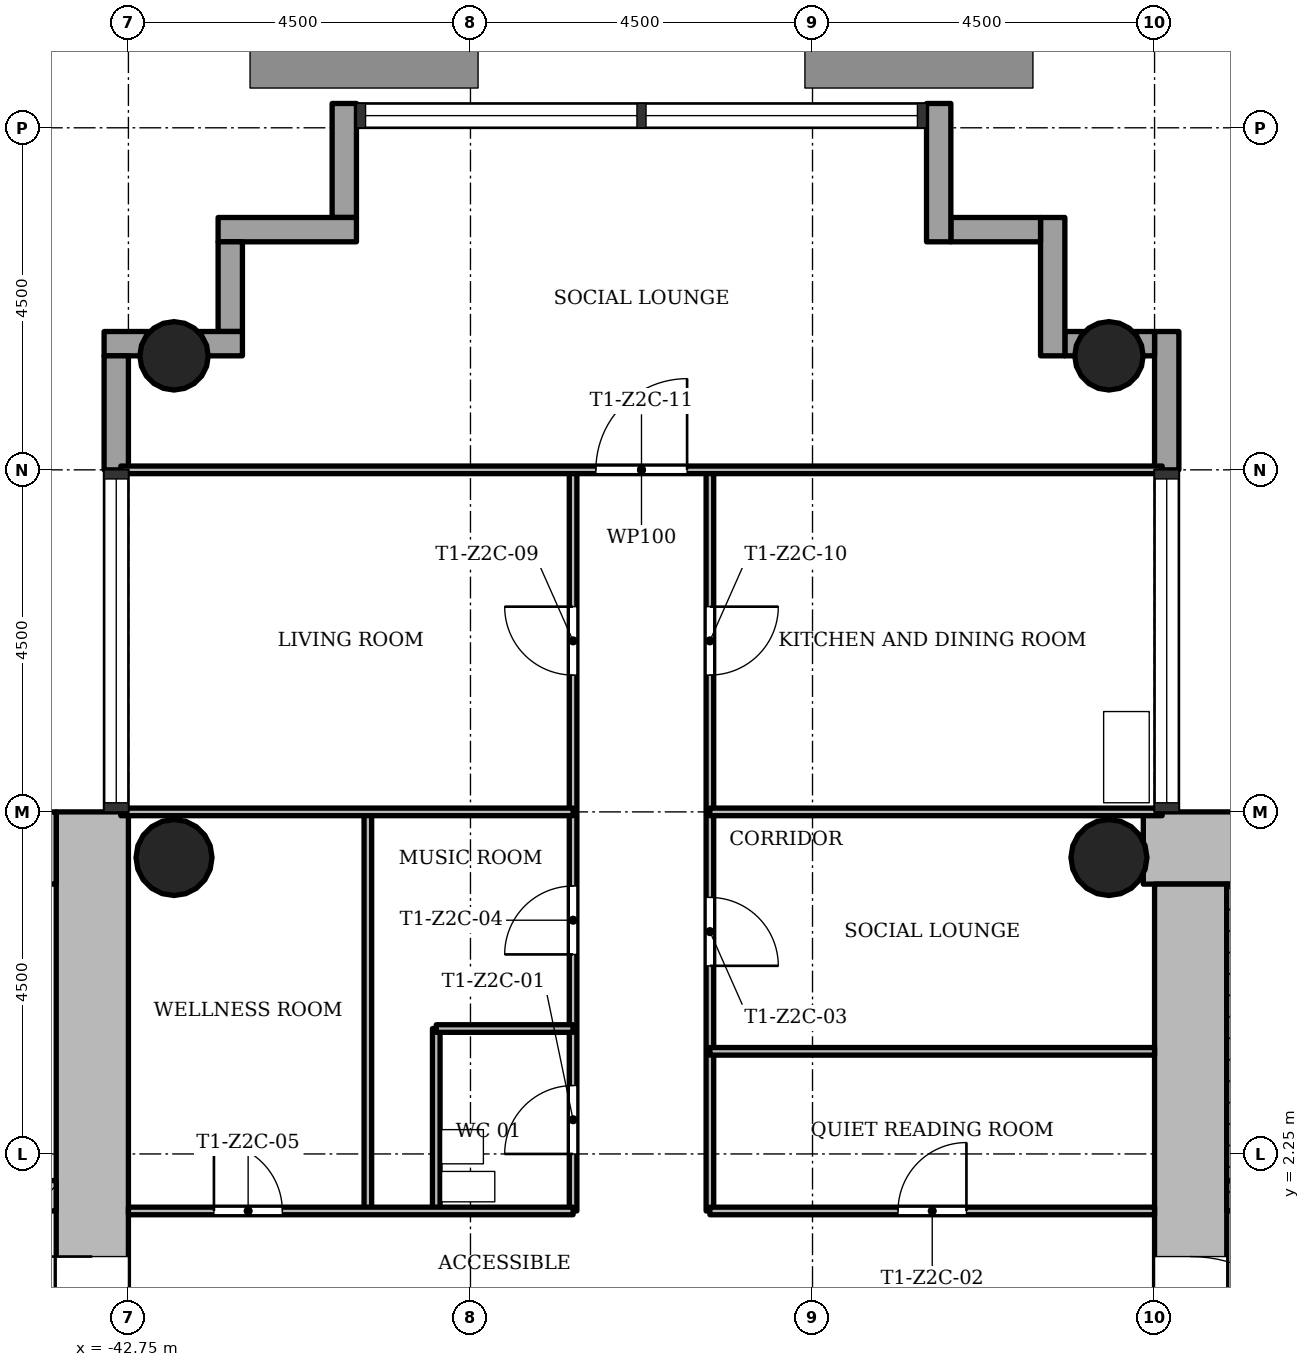
"""IFC4 building model, lengths in metres.
Left out: names, types, materials, properties, quantities, classifications, styles, units other than length and angle.
Written with IfcOpenShell. Run it as: python <this file> out.ifc"""

import sys

from ifc_helpers import new_model, si_unit, direction, frame, frame_2d, origin, origin_2d, place, context, subcontext, project, spatial, rectangle, hollow_circle, extrude, element, fill, save


model = new_model("IFC4")
c1 = context("Model", 3, precision=1e-05, world=origin(), true_north=direction((0.0, 1.0)))
c2 = subcontext(c1, "Body", "Model", "MODEL_VIEW")
j1 = project(units=[si_unit("LENGTHUNIT", "METRE"), si_unit("PLANEANGLEUNIT", "RADIAN")], contexts=[c1])
p1 = place(None, origin())
s1 = spatial("IfcSite", under=j1, at=p1, CompositionType="ELEMENT")
p2 = place(p1, origin())
s2 = spatial("IfcBuilding", under=s1, at=p2, CompositionType="ELEMENT")
p3 = place(p2, frame((0.0, 0.0, 93.6)))
s3 = spatial("IfcBuildingStorey", under=s2, at=p3, CompositionType="ELEMENT", Elevation=93.6)
p4 = place(p3, frame((-20.702, 6.275, 0.0), z_axis=(0.0, 0.0, 1.0), x_axis=(-1.0, 0.0, 0.0)))
e1 = element("IfcWall", 1, at=p4, inside=s3, PredefinedType="SHEAR", context=c2, shape_type="SweptSolid", body=[
    extrude(rectangle(XDim=8.696, YDim=0.95, at=frame_2d((4.348, 0.0))), origin(), (0.0, 0.0, 1.0), 3.4),
])
p5 = place(p3, frame((-28.775, 5.8, 0.0), z_axis=(0.0, 0.0, 1.0), x_axis=(0.0, -1.0, 0.0)))
e2 = element("IfcWall", 2, at=p5, inside=s3, PredefinedType="SHEAR", context=c2, shape_type="SweptSolid", body=[
    extrude(rectangle(XDim=12.55, YDim=0.95, at=frame_2d((6.275, 0.0))), origin(), (0.0, 0.0, 1.0), 3.4),
])
p6 = place(p5, frame((4.9, 0.0, 0.0)))
e3 = element("IfcOpeningElement", 3, at=p6, cuts=e2, PredefinedType="OPENING", context=c2, shape_type="SweptSolid", body=[
    extrude(rectangle(XDim=1.8, YDim=2.1, at=frame_2d((0.9, 1.05))), frame((0.0, 0.485, 0.0), z_axis=(0.0, -1.0, 0.0), x_axis=(1.0, 0.0, 0.0)), (0.0, 0.0, 1.0), 0.97),
])
p7 = place(p3, frame((-28.3, 1.7, 0.0), z_axis=(0.0, 0.0, 1.0), x_axis=(1.0, 0.0, 0.0)))
e4 = element("IfcWall", 4, at=p7, inside=s3, PredefinedType="SHEAR", context=c2, shape_type="SweptSolid", body=[
    extrude(rectangle(XDim=7.1, YDim=0.4, at=frame_2d((3.55, 0.0))), origin(), (0.0, 0.0, 1.0), 3.4),
])
p8 = place(p7, frame((0.7, 0.0, 0.0)))
e5 = element("IfcOpeningElement", 5, at=p8, cuts=e4, PredefinedType="OPENING", context=c2, shape_type="SweptSolid", body=[
    extrude(rectangle(XDim=0.9, YDim=2.1, at=frame_2d((0.45, 1.05))), frame((0.0, 0.21, 0.0), z_axis=(0.0, -1.0, 0.0), x_axis=(1.0, 0.0, 0.0)), (0.0, 0.0, 1.0), 0.42),
])
p9 = place(p3, frame((-43.225, -5.8, 0.0), z_axis=(0.0, 0.0, 1.0), x_axis=(0.0, 1.0, 0.0)))
e6 = element("IfcWall", 6, at=p9, inside=s3, PredefinedType="SHEAR", context=c2, shape_type="SweptSolid", body=[
    extrude(rectangle(XDim=12.55, YDim=0.95, at=frame_2d((6.275, 0.0))), origin(), (0.0, 0.0, 1.0), 3.4),
])
p10 = place(p9, frame((4.9, 0.0, 0.0)))
e7 = element("IfcOpeningElement", 7, at=p10, cuts=e6, PredefinedType="OPENING", context=c2, shape_type="SweptSolid", body=[
    extrude(rectangle(XDim=1.8, YDim=2.1, at=frame_2d((0.9, 1.05))), frame((0.0, 0.485, 0.0), z_axis=(0.0, -1.0, 0.0), x_axis=(1.0, 0.0, 0.0)), (0.0, 0.0, 1.0), 0.97),
])
p11 = place(p3, frame((-43.7, 6.275, 0.0), z_axis=(0.0, 0.0, 1.0), x_axis=(-1.0, 0.0, 0.0)))
e8 = element("IfcWall", 8, at=p11, inside=s3, PredefinedType="SHEAR", context=c2, shape_type="SweptSolid", body=[
    extrude(rectangle(XDim=8.05, YDim=0.95, at=frame_2d((4.025, 0.0))), origin(), (0.0, 0.0, 1.0), 3.4),
])
p12 = place(p3, frame((-50.8, 1.7, 0.0), z_axis=(0.0, 0.0, 1.0), x_axis=(1.0, 0.0, 0.0)))
e9 = element("IfcWall", 9, at=p12, inside=s3, PredefinedType="SHEAR", context=c2, shape_type="SweptSolid", body=[
    extrude(rectangle(XDim=7.1, YDim=0.4, at=frame_2d((3.55, 0.0))), origin(), (0.0, 0.0, 1.0), 3.4),
])
p13 = place(p12, frame((5.2, 0.0, 0.0)))
e10 = element("IfcOpeningElement", 10, at=p13, cuts=e9, PredefinedType="OPENING", context=c2, shape_type="SweptSolid", body=[
    extrude(rectangle(XDim=1.1, YDim=2.1, at=frame_2d((0.55, 1.05))), frame((0.0, 0.21, 0.0), z_axis=(0.0, -1.0, 0.0), x_axis=(1.0, 0.0, 0.0)), (0.0, 0.0, 1.0), 0.42),
])
for number, where, z_axis, x_axis in (
    (11, (-29.85, 12.75, 0.0), (0.0, 0.0, 1.0), (1.0, 0.0, 0.0)),
    (12, (-42.15, 12.75, 0.0), (0.0, 0.0, 1.0), (1.0, 0.0, 0.0)),
):
    element("IfcColumn", number, at=place(p3, frame(where, z_axis=z_axis, x_axis=x_axis)), inside=s3, PredefinedType="COLUMN", context=c2, shape_type="SweptSolid", body=[
        extrude(hollow_circle(Radius=0.45, WallThickness=0.032, at=origin_2d()), origin(), (0.0, 0.0, 1.0), 3.4),
    ])
for number, where, z_axis, x_axis in (
    (13, (-29.85, 6.15, 0.0), (0.0, 0.0, 1.0), (1.0, 0.0, 0.0)),
    (14, (-42.15, 6.15, 0.0), (0.0, 0.0, 1.0), (1.0, 0.0, 0.0)),
):
    element("IfcColumn", number, at=place(p3, frame(where, z_axis=z_axis, x_axis=x_axis)), inside=s3, PredefinedType="COLUMN", context=c2, shape_type="SweptSolid", body=[
        extrude(hollow_circle(Radius=0.5, WallThickness=0.036, at=origin_2d()), origin(), (0.0, 0.0, 1.0), 3.4),
    ])
p14 = place(p3, frame((-29.09, 11.25, -0.3), z_axis=(0.0, 0.0, 1.0), x_axis=(0.0, 1.0, 0.0)))
e15 = element("IfcWall", 15, at=p14, inside=s3, PredefinedType="STANDARD", context=c2, shape_type="SweptSolid", body=[
    extrude(rectangle(XDim=1.82, YDim=0.32, at=frame_2d((0.91, 0.0))), origin(), (0.0, 0.0, 1.0), 3.4),
])
p15 = place(p3, frame((-29.25, 12.91, -0.3), z_axis=(0.0, 0.0, 1.0), x_axis=(-1.0, 0.0, 0.0)))
e16 = element("IfcWall", 16, at=p15, inside=s3, PredefinedType="STANDARD", context=c2, shape_type="SweptSolid", body=[
    extrude(rectangle(XDim=1.18, YDim=0.32, at=frame_2d((0.59, 0.0))), origin(), (0.0, 0.0, 1.0), 3.4),
])
p16 = place(p3, frame((-30.59, 12.75, -0.3), z_axis=(0.0, 0.0, 1.0), x_axis=(0.0, 1.0, 0.0)))
e17 = element("IfcWall", 17, at=p16, inside=s3, PredefinedType="STANDARD", context=c2, shape_type="SweptSolid", body=[
    extrude(rectangle(XDim=1.82, YDim=0.32, at=frame_2d((0.91, 0.0))), origin(), (0.0, 0.0, 1.0), 3.4),
])
p17 = place(p3, frame((-30.75, 14.41, -0.3), z_axis=(0.0, 0.0, 1.0), x_axis=(-1.0, 0.0, 0.0)))
e18 = element("IfcWall", 18, at=p17, inside=s3, PredefinedType="STANDARD", context=c2, shape_type="SweptSolid", body=[
    extrude(rectangle(XDim=1.18, YDim=0.32, at=frame_2d((0.59, 0.0))), origin(), (0.0, 0.0, 1.0), 3.4),
])
p18 = place(p3, frame((-32.09, 14.25, -0.3), z_axis=(0.0, 0.0, 1.0), x_axis=(0.0, 1.0, 0.0)))
e19 = element("IfcWall", 19, at=p18, inside=s3, PredefinedType="STANDARD", context=c2, shape_type="SweptSolid", body=[
    extrude(rectangle(XDim=1.82, YDim=0.32, at=frame_2d((0.91, 0.0))), origin(), (0.0, 0.0, 1.0), 3.4),
])
p19 = place(p3, frame((-39.91, 16.07, -0.3), z_axis=(0.0, 0.0, 1.0), x_axis=(0.0, -1.0, 0.0)))
e20 = element("IfcWall", 20, at=p19, inside=s3, PredefinedType="STANDARD", context=c2, shape_type="SweptSolid", body=[
    extrude(rectangle(XDim=1.5, YDim=0.32, at=frame_2d((0.75, 0.0))), origin(), (0.0, 0.0, 1.0), 3.4),
])
p20 = place(p3, frame((-39.75, 14.41, -0.3), z_axis=(0.0, 0.0, 1.0), x_axis=(-1.0, 0.0, 0.0)))
e21 = element("IfcWall", 21, at=p20, inside=s3, PredefinedType="STANDARD", context=c2, shape_type="SweptSolid", body=[
    extrude(rectangle(XDim=1.82, YDim=0.32, at=frame_2d((0.91, 0.0))), origin(), (0.0, 0.0, 1.0), 3.4),
])
p21 = place(p3, frame((-41.41, 14.25, -0.3), z_axis=(0.0, 0.0, 1.0), x_axis=(0.0, -1.0, 0.0)))
e22 = element("IfcWall", 22, at=p21, inside=s3, PredefinedType="STANDARD", context=c2, shape_type="SweptSolid", body=[
    extrude(rectangle(XDim=1.18, YDim=0.32, at=frame_2d((0.59, 0.0))), origin(), (0.0, 0.0, 1.0), 3.4),
])
p22 = place(p3, frame((-41.25, 12.91, -0.3), z_axis=(0.0, 0.0, 1.0), x_axis=(-1.0, 0.0, 0.0)))
e23 = element("IfcWall", 23, at=p22, inside=s3, PredefinedType="STANDARD", context=c2, shape_type="SweptSolid", body=[
    extrude(rectangle(XDim=1.82, YDim=0.32, at=frame_2d((0.91, 0.0))), origin(), (0.0, 0.0, 1.0), 3.4),
])
p23 = place(p3, frame((-42.91, 12.75, -0.3), z_axis=(0.0, 0.0, 1.0), x_axis=(0.0, -1.0, 0.0)))
e24 = element("IfcWall", 24, at=p23, inside=s3, PredefinedType="STANDARD", context=c2, shape_type="SweptSolid", body=[
    extrude(rectangle(XDim=1.5, YDim=0.32, at=frame_2d((0.75, 0.0))), origin(), (0.0, 0.0, 1.0), 3.4),
])
p24 = place(p3, frame((-39.6, 1.5, 0.0), z_axis=(0.0, 0.0, 1.0), x_axis=(0.0, 1.0, 0.0)))
e25 = element("IfcWall", 25, at=p24, inside=s3, PredefinedType="PARTITIONING", context=c2, shape_type="SweptSolid", body=[
    extrude(rectangle(XDim=5.25, YDim=0.1, at=frame_2d((2.625, 0.0))), origin(), (0.0, 0.0, 1.0), 3.0),
])
p25 = place(p3, frame((-38.7, 1.5, 0.0), z_axis=(0.0, 0.0, 1.0), x_axis=(0.0, 1.0, 0.0)))
e26 = element("IfcWall", 26, at=p25, inside=s3, PredefinedType="PARTITIONING", context=c2, shape_type="SweptSolid", body=[
    extrude(rectangle(XDim=2.4, YDim=0.1, at=frame_2d((1.2, 0.0))), origin(), (0.0, 0.0, 1.0), 3.0),
])
p26 = place(p3, frame((-36.9, 1.5, 0.0), z_axis=(0.0, 0.0, 1.0), x_axis=(0.0, 1.0, 0.0)))
e27 = element("IfcWall", 27, at=p26, inside=s3, PredefinedType="PARTITIONING", context=c2, shape_type="SweptSolid", body=[
    extrude(rectangle(XDim=9.75, YDim=0.1, at=frame_2d((4.875, 0.0))), origin(), (0.0, 0.0, 1.0), 3.0),
])
p27 = place(p26, frame((0.75, 0.0, 0.0)))
e28 = element("IfcOpeningElement", 28, at=p27, cuts=e27, PredefinedType="OPENING", context=c2, shape_type="SweptSolid", body=[
    extrude(rectangle(XDim=0.9, YDim=2.1, at=frame_2d((0.45, 1.05))), frame((0.0, 0.06, 0.0), z_axis=(0.0, -1.0, 0.0), x_axis=(1.0, 0.0, 0.0)), (0.0, 0.0, 1.0), 0.12),
])
p28 = place(p26, frame((3.375, 0.0, 0.0)))
e29 = element("IfcOpeningElement", 29, at=p28, cuts=e27, PredefinedType="OPENING", context=c2, shape_type="SweptSolid", body=[
    extrude(rectangle(XDim=0.9, YDim=2.1, at=frame_2d((0.45, 1.05))), frame((0.0, 0.06, 0.0), z_axis=(0.0, -1.0, 0.0), x_axis=(1.0, 0.0, 0.0)), (0.0, 0.0, 1.0), 0.12),
])
p29 = place(p26, frame((7.05, 0.0, 0.0)))
e30 = element("IfcOpeningElement", 30, at=p29, cuts=e27, PredefinedType="OPENING", context=c2, shape_type="SweptSolid", body=[
    extrude(rectangle(XDim=0.9, YDim=2.1, at=frame_2d((0.45, 1.05))), frame((0.0, 0.06, 0.0), z_axis=(0.0, -1.0, 0.0), x_axis=(1.0, 0.0, 0.0)), (0.0, 0.0, 1.0), 0.12),
])
p30 = place(p3, frame((-35.1, 1.5, 0.0), z_axis=(0.0, 0.0, 1.0), x_axis=(0.0, 1.0, 0.0)))
e31 = element("IfcWall", 31, at=p30, inside=s3, PredefinedType="PARTITIONING", context=c2, shape_type="SweptSolid", body=[
    extrude(rectangle(XDim=9.75, YDim=0.1, at=frame_2d((4.875, 0.0))), origin(), (0.0, 0.0, 1.0), 3.0),
])
p31 = place(p30, frame((3.225, 0.0, 0.0)))
e32 = element("IfcOpeningElement", 32, at=p31, cuts=e31, PredefinedType="OPENING", context=c2, shape_type="SweptSolid", body=[
    extrude(rectangle(XDim=0.9, YDim=2.1, at=frame_2d((0.45, 1.05))), frame((0.0, 0.06, 0.0), z_axis=(0.0, -1.0, 0.0), x_axis=(1.0, 0.0, 0.0)), (0.0, 0.0, 1.0), 0.12),
])
p32 = place(p30, frame((7.05, 0.0, 0.0)))
e33 = element("IfcOpeningElement", 33, at=p32, cuts=e31, PredefinedType="OPENING", context=c2, shape_type="SweptSolid", body=[
    extrude(rectangle(XDim=0.9, YDim=2.1, at=frame_2d((0.45, 1.05))), frame((0.0, 0.06, 0.0), z_axis=(0.0, -1.0, 0.0), x_axis=(1.0, 0.0, 0.0)), (0.0, 0.0, 1.0), 0.12),
])
p33 = place(p3, frame((-42.75, 1.5, 0.0), z_axis=(0.0, 0.0, 1.0), x_axis=(1.0, 0.0, 0.0)))
e34 = element("IfcWall", 34, at=p33, inside=s3, PredefinedType="PARTITIONING", context=c2, shape_type="SweptSolid", body=[
    extrude(rectangle(XDim=5.85, YDim=0.1, at=frame_2d((2.925, 0.0))), origin(), (0.0, 0.0, 1.0), 3.0),
])
p34 = place(p33, frame((1.125, 0.0, 0.0)))
e35 = element("IfcOpeningElement", 35, at=p34, cuts=e34, PredefinedType="OPENING", context=c2, shape_type="SweptSolid", body=[
    extrude(rectangle(XDim=0.9, YDim=2.1, at=frame_2d((0.45, 1.05))), frame((0.0, 0.06, 0.0), z_axis=(0.0, -1.0, 0.0), x_axis=(1.0, 0.0, 0.0)), (0.0, 0.0, 1.0), 0.12),
])
p35 = place(p3, frame((-35.1, 1.5, 0.0), z_axis=(0.0, 0.0, 1.0), x_axis=(1.0, 0.0, 0.0)))
e36 = element("IfcWall", 36, at=p35, inside=s3, PredefinedType="PARTITIONING", context=c2, shape_type="SweptSolid", body=[
    extrude(rectangle(XDim=5.85, YDim=0.1, at=frame_2d((2.925, 0.0))), origin(), (0.0, 0.0, 1.0), 3.0),
])
p36 = place(p35, frame((2.475, 0.0, 0.0)))
e37 = element("IfcOpeningElement", 37, at=p36, cuts=e36, PredefinedType="OPENING", context=c2, shape_type="SweptSolid", body=[
    extrude(rectangle(XDim=0.9, YDim=2.1, at=frame_2d((0.45, 1.05))), frame((0.0, 0.06, 0.0), z_axis=(0.0, -1.0, 0.0), x_axis=(1.0, 0.0, 0.0)), (0.0, 0.0, 1.0), 0.12),
])
p37 = place(p3, frame((-35.1, 3.6, 0.0), z_axis=(0.0, 0.0, 1.0), x_axis=(1.0, 0.0, 0.0)))
e38 = element("IfcWall", 38, at=p37, inside=s3, PredefinedType="PARTITIONING", context=c2, shape_type="SweptSolid", body=[
    extrude(rectangle(XDim=5.85, YDim=0.1, at=frame_2d((2.925, 0.0))), origin(), (0.0, 0.0, 1.0), 3.0),
])
p38 = place(p3, frame((-38.7, 3.9, 0.0), z_axis=(0.0, 0.0, 1.0), x_axis=(1.0, 0.0, 0.0)))
e39 = element("IfcWall", 39, at=p38, inside=s3, PredefinedType="PARTITIONING", context=c2, shape_type="SweptSolid", body=[
    extrude(rectangle(XDim=1.8, YDim=0.1, at=frame_2d((0.9, 0.0))), origin(), (0.0, 0.0, 1.0), 3.0),
])
for number, where, z_axis, x_axis in (
    (40, (-42.85, 6.75, 0.0), (0.0, 0.0, 1.0), (1.0, 0.0, 0.0)),
    (41, (-35.1, 6.75, 0.0), (0.0, 0.0, 1.0), (1.0, 0.0, 0.0)),
):
    element("IfcWall", number, at=place(p3, frame(where, z_axis=z_axis, x_axis=x_axis)), inside=s3, PredefinedType="PARTITIONING", context=c2, shape_type="SweptSolid", body=[
        extrude(rectangle(XDim=5.95, YDim=0.1, at=frame_2d((2.975, 0.0))), origin(), (0.0, 0.0, 1.0), 3.0),
    ])
p39 = place(p3, frame((-42.85, 11.25, 0.0), z_axis=(0.0, 0.0, 1.0), x_axis=(1.0, 0.0, 0.0)))
e42 = element("IfcWall", 42, at=p39, inside=s3, PredefinedType="PARTITIONING", context=c2, shape_type="SweptSolid", body=[
    extrude(rectangle(XDim=13.7, YDim=0.1, at=frame_2d((6.85, 0.0))), origin(), (0.0, 0.0, 1.0), 3.0),
])
p40 = place(p39, frame((6.25, 0.0, 0.0)))
e43 = element("IfcOpeningElement", 43, at=p40, cuts=e42, PredefinedType="OPENING", context=c2, shape_type="SweptSolid", body=[
    extrude(rectangle(XDim=1.2, YDim=2.1, at=frame_2d((0.6, 1.05))), frame((0.0, 0.06, 0.0), z_axis=(0.0, -1.0, 0.0), x_axis=(1.0, 0.0, 0.0)), (0.0, 0.0, 1.0), 0.12),
])
p41 = place(p3, frame((-28.175, 1.9, 0.0), z_axis=(0.0, 0.0, 1.0), x_axis=(0.0, 1.0, 0.0)))
e44 = element("IfcWall", 44, at=p41, inside=s3, PredefinedType="SHEAR", context=c2, shape_type="SweptSolid", body=[
    extrude(rectangle(XDim=3.9, YDim=0.25, at=frame_2d((1.95, 0.0))), origin(), (0.0, 0.0, 1.0), 3.4),
])
p42 = place(p27, origin())
e45 = element("IfcDoor", 45, at=p42, inside=s3, OperationType="SINGLE_SWING_RIGHT", PredefinedType="DOOR", context=c2, shape_type="SweptSolid", body=[
    extrude(rectangle(XDim=0.9, YDim=2.1, at=frame_2d((0.45, 1.05))), frame((0.0, 0.025, 0.0), z_axis=(0.0, -1.0, 0.0), x_axis=(1.0, 0.0, 0.0)), (0.0, 0.0, 1.0), 0.05),
])
fill(e28, e45)
p43 = place(p36, origin())
e46 = element("IfcDoor", 46, at=p43, inside=s3, OperationType="SINGLE_SWING_LEFT", PredefinedType="DOOR", context=c2, shape_type="SweptSolid", body=[
    extrude(rectangle(XDim=0.9, YDim=2.1, at=frame_2d((0.45, 1.05))), frame((0.0, 0.025, 0.0), z_axis=(0.0, -1.0, 0.0), x_axis=(1.0, 0.0, 0.0)), (0.0, 0.0, 1.0), 0.05),
])
fill(e37, e46)
p44 = place(p31, origin())
e47 = element("IfcDoor", 47, at=p44, inside=s3, OperationType="SINGLE_SWING_LEFT", PredefinedType="DOOR", context=c2, shape_type="SweptSolid", body=[
    extrude(rectangle(XDim=0.9, YDim=2.1, at=frame_2d((0.45, 1.05))), frame((0.0, 0.025, 0.0), z_axis=(0.0, -1.0, 0.0), x_axis=(1.0, 0.0, 0.0)), (0.0, 0.0, 1.0), 0.05),
])
fill(e32, e47)
p45 = place(p28, origin())
e48 = element("IfcDoor", 48, at=p45, inside=s3, OperationType="SINGLE_SWING_RIGHT", PredefinedType="DOOR", context=c2, shape_type="SweptSolid", body=[
    extrude(rectangle(XDim=0.9, YDim=2.1, at=frame_2d((0.45, 1.05))), frame((0.0, 0.025, 0.0), z_axis=(0.0, -1.0, 0.0), x_axis=(1.0, 0.0, 0.0)), (0.0, 0.0, 1.0), 0.05),
])
fill(e29, e48)
p46 = place(p34, origin())
e49 = element("IfcDoor", 49, at=p46, inside=s3, OperationType="SINGLE_SWING_RIGHT", PredefinedType="DOOR", context=c2, shape_type="SweptSolid", body=[
    extrude(rectangle(XDim=0.9, YDim=2.1, at=frame_2d((0.45, 1.05))), frame((0.0, 0.025, 0.0), z_axis=(0.0, -1.0, 0.0), x_axis=(1.0, 0.0, 0.0)), (0.0, 0.0, 1.0), 0.05),
])
fill(e35, e49)
p47 = place(p29, origin())
e50 = element("IfcDoor", 50, at=p47, inside=s3, OperationType="SINGLE_SWING_LEFT", PredefinedType="DOOR", context=c2, shape_type="SweptSolid", body=[
    extrude(rectangle(XDim=0.9, YDim=2.1, at=frame_2d((0.45, 1.05))), frame((0.0, 0.025, 0.0), z_axis=(0.0, -1.0, 0.0), x_axis=(1.0, 0.0, 0.0)), (0.0, 0.0, 1.0), 0.05),
])
fill(e30, e50)
p48 = place(p32, origin())
e51 = element("IfcDoor", 51, at=p48, inside=s3, OperationType="SINGLE_SWING_RIGHT", PredefinedType="DOOR", context=c2, shape_type="SweptSolid", body=[
    extrude(rectangle(XDim=0.9, YDim=2.1, at=frame_2d((0.45, 1.05))), frame((0.0, 0.025, 0.0), z_axis=(0.0, -1.0, 0.0), x_axis=(1.0, 0.0, 0.0)), (0.0, 0.0, 1.0), 0.05),
])
fill(e33, e51)
p49 = place(p40, origin())
e52 = element("IfcDoor", 52, at=p49, inside=s3, OperationType="SINGLE_SWING_LEFT", PredefinedType="DOOR", context=c2, shape_type="SweptSolid", body=[
    extrude(rectangle(XDim=1.2, YDim=2.1, at=frame_2d((0.6, 1.05))), frame((0.0, 0.025, 0.0), z_axis=(0.0, -1.0, 0.0), x_axis=(1.0, 0.0, 0.0)), (0.0, 0.0, 1.0), 0.05),
])
fill(e43, e52)
p50 = place(p6, origin())
e53 = element("IfcDoor", 53, at=p50, inside=s3, OperationType="SINGLE_SWING_LEFT", PredefinedType="DOOR", context=c2, shape_type="SweptSolid", body=[
    extrude(rectangle(XDim=1.8, YDim=2.1, at=frame_2d((0.9, 1.05))), frame((0.0, 0.025, 0.0), z_axis=(0.0, -1.0, 0.0), x_axis=(1.0, 0.0, 0.0)), (0.0, 0.0, 1.0), 0.05),
])
fill(e3, e53)
p51 = place(p10, origin())
e54 = element("IfcDoor", 54, at=p51, inside=s3, OperationType="SINGLE_SWING_LEFT", PredefinedType="DOOR", context=c2, shape_type="SweptSolid", body=[
    extrude(rectangle(XDim=1.8, YDim=2.1, at=frame_2d((0.9, 1.05))), frame((0.0, 0.025, 0.0), z_axis=(0.0, -1.0, 0.0), x_axis=(1.0, 0.0, 0.0)), (0.0, 0.0, 1.0), 0.05),
])
fill(e7, e54)
save(model, sys.argv[1])
